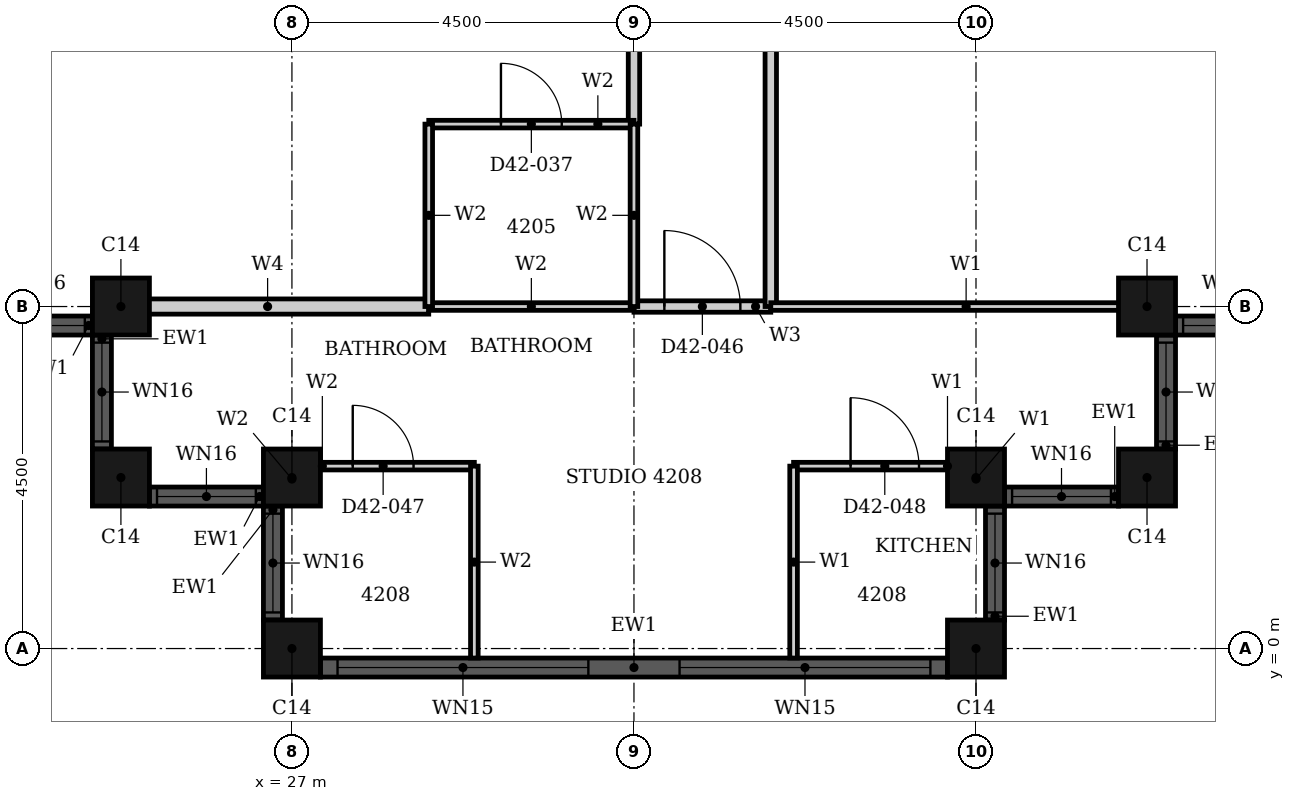
"""IFC4 building model, lengths in metres.
Left out: names, types, materials, properties, quantities, classifications, styles, units other than length and angle.
Written with IfcOpenShell. Run it as: python <this file> out.ifc"""

import sys

from ifc_helpers import new_model, si_unit, direction, frame, frame_2d, origin, origin_2d, place, context, subcontext, project, spatial, rectangle, hollow_rectangle, extrude, element, fill, save


model = new_model("IFC4")
c1 = context("Model", 3, precision=1e-05, world=origin(), true_north=direction((0.0, 1.0)))
c2 = subcontext(c1, "Body", "Model", "MODEL_VIEW")
j1 = project(units=[si_unit("LENGTHUNIT", "METRE"), si_unit("PLANEANGLEUNIT", "RADIAN")], contexts=[c1])
p1 = place(None, origin())
s1 = spatial("IfcSite", under=j1, at=p1, CompositionType="ELEMENT")
p2 = place(p1, origin())
s2 = spatial("IfcBuilding", under=s1, at=p2, CompositionType="ELEMENT")
p3 = place(p2, frame((0.0, 0.0, 169.1)))
s3 = spatial("IfcBuildingStorey", under=s2, at=p3, CompositionType="ELEMENT", Elevation=169.1)
for number, where, z_axis, x_axis in (
    (1, (24.75, 4.5, 0.0), (0.0, 0.0, 1.0), (1.0, 0.0, 0.0)),
    (2, (24.75, 2.25, 0.0), (0.0, 0.0, 1.0), (1.0, 0.0, 0.0)),
    (3, (27.0, 2.25, 0.0), (0.0, 0.0, 1.0), (1.0, 0.0, 0.0)),
    (4, (27.0, 0.0, 0.0), (0.0, 0.0, 1.0), (1.0, 0.0, 0.0)),
    (5, (36.0, 0.0, 0.0), (0.0, 0.0, 1.0), (1.0, 0.0, 0.0)),
    (6, (36.0, 2.25, 0.0), (0.0, 0.0, 1.0), (1.0, 0.0, 0.0)),
    (7, (38.25, 2.25, 0.0), (0.0, 0.0, 1.0), (1.0, 0.0, 0.0)),
    (8, (38.25, 4.5, 0.0), (0.0, 0.0, 1.0), (1.0, 0.0, 0.0)),
):
    element("IfcColumn", number, at=place(p3, frame(where, z_axis=z_axis, x_axis=x_axis)), inside=s3, PredefinedType="COLUMN", context=c2, shape_type="SweptSolid", body=[
        extrude(hollow_rectangle(XDim=0.75, YDim=0.75, WallThickness=0.024, at=origin_2d()), origin(), (0.0, 0.0, 1.0), 3.7),
    ])
p4 = place(p3, frame((22.875, 4.25, 0.0), z_axis=(0.0, 0.0, 1.0), x_axis=(1.0, 0.0, 0.0)))
e9 = element("IfcWall", 9, at=p4, inside=s3, PredefinedType="SOLIDWALL", context=c2, shape_type="SweptSolid", body=[
    extrude(rectangle(XDim=1.5, YDim=0.25, at=frame_2d((0.75, 0.0))), origin(), (0.0, 0.0, 1.0), 3.7),
])
p5 = place(p4, frame((0.1, 0.0, 0.9)))
e10 = element("IfcOpeningElement", 10, at=p5, cuts=e9, PredefinedType="OPENING", context=c2, shape_type="SweptSolid", body=[
    extrude(rectangle(XDim=1.3, YDim=1.85, at=frame_2d((0.65, 0.925))), frame((0.0, 0.135, 0.0), z_axis=(0.0, -1.0, 0.0), x_axis=(1.0, 0.0, 0.0)), (0.0, 0.0, 1.0), 0.27),
])
p6 = place(p3, frame((24.5, 4.125, 0.0), z_axis=(0.0, 0.0, 1.0), x_axis=(0.0, -1.0, 0.0)))
e11 = element("IfcWall", 11, at=p6, inside=s3, PredefinedType="SOLIDWALL", context=c2, shape_type="SweptSolid", body=[
    extrude(rectangle(XDim=1.5, YDim=0.25, at=frame_2d((0.75, 0.0))), origin(), (0.0, 0.0, 1.0), 3.7),
])
p7 = place(p6, frame((0.1, 0.0, 0.9)))
e12 = element("IfcOpeningElement", 12, at=p7, cuts=e11, PredefinedType="OPENING", context=c2, shape_type="SweptSolid", body=[
    extrude(rectangle(XDim=1.3, YDim=1.85, at=frame_2d((0.65, 0.925))), frame((0.0, 0.135, 0.0), z_axis=(0.0, -1.0, 0.0), x_axis=(1.0, 0.0, 0.0)), (0.0, 0.0, 1.0), 0.27),
])
p8 = place(p3, frame((25.125, 2.0, 0.0), z_axis=(0.0, 0.0, 1.0), x_axis=(1.0, 0.0, 0.0)))
e13 = element("IfcWall", 13, at=p8, inside=s3, PredefinedType="SOLIDWALL", context=c2, shape_type="SweptSolid", body=[
    extrude(rectangle(XDim=1.5, YDim=0.25, at=frame_2d((0.75, 0.0))), origin(), (0.0, 0.0, 1.0), 3.7),
])
p9 = place(p8, frame((0.1, 0.0, 0.9)))
e14 = element("IfcOpeningElement", 14, at=p9, cuts=e13, PredefinedType="OPENING", context=c2, shape_type="SweptSolid", body=[
    extrude(rectangle(XDim=1.3, YDim=1.85, at=frame_2d((0.65, 0.925))), frame((0.0, 0.135, 0.0), z_axis=(0.0, -1.0, 0.0), x_axis=(1.0, 0.0, 0.0)), (0.0, 0.0, 1.0), 0.27),
])
p10 = place(p3, frame((26.75, 1.875, 0.0), z_axis=(0.0, 0.0, 1.0), x_axis=(0.0, -1.0, 0.0)))
e15 = element("IfcWall", 15, at=p10, inside=s3, PredefinedType="SOLIDWALL", context=c2, shape_type="SweptSolid", body=[
    extrude(rectangle(XDim=1.5, YDim=0.25, at=frame_2d((0.75, 0.0))), origin(), (0.0, 0.0, 1.0), 3.7),
])
p11 = place(p10, frame((0.1, 0.0, 0.9)))
e16 = element("IfcOpeningElement", 16, at=p11, cuts=e15, PredefinedType="OPENING", context=c2, shape_type="SweptSolid", body=[
    extrude(rectangle(XDim=1.3, YDim=1.85, at=frame_2d((0.65, 0.925))), frame((0.0, 0.135, 0.0), z_axis=(0.0, -1.0, 0.0), x_axis=(1.0, 0.0, 0.0)), (0.0, 0.0, 1.0), 0.27),
])
p12 = place(p3, frame((27.375, -0.25, 0.0), z_axis=(0.0, 0.0, 1.0), x_axis=(1.0, 0.0, 0.0)))
e17 = element("IfcWall", 17, at=p12, inside=s3, PredefinedType="SOLIDWALL", context=c2, shape_type="SweptSolid", body=[
    extrude(rectangle(XDim=8.25, YDim=0.25, at=frame_2d((4.125, 0.0))), origin(), (0.0, 0.0, 1.0), 3.7),
])
p13 = place(p12, frame((0.225, 0.0, 0.45)))
e18 = element("IfcOpeningElement", 18, at=p13, cuts=e17, PredefinedType="OPENING", context=c2, shape_type="SweptSolid", body=[
    extrude(rectangle(XDim=3.3, YDim=2.3, at=frame_2d((1.65, 1.15))), frame((0.0, 0.135, 0.0), z_axis=(0.0, -1.0, 0.0), x_axis=(1.0, 0.0, 0.0)), (0.0, 0.0, 1.0), 0.27),
])
p14 = place(p12, frame((4.725, 0.0, 0.45)))
e19 = element("IfcOpeningElement", 19, at=p14, cuts=e17, PredefinedType="OPENING", context=c2, shape_type="SweptSolid", body=[
    extrude(rectangle(XDim=3.3, YDim=2.3, at=frame_2d((1.65, 1.15))), frame((0.0, 0.135, 0.0), z_axis=(0.0, -1.0, 0.0), x_axis=(1.0, 0.0, 0.0)), (0.0, 0.0, 1.0), 0.27),
])
p15 = place(p3, frame((36.25, 0.375, 0.0), z_axis=(0.0, 0.0, 1.0), x_axis=(0.0, 1.0, 0.0)))
e20 = element("IfcWall", 20, at=p15, inside=s3, PredefinedType="SOLIDWALL", context=c2, shape_type="SweptSolid", body=[
    extrude(rectangle(XDim=1.5, YDim=0.25, at=frame_2d((0.75, 0.0))), origin(), (0.0, 0.0, 1.0), 3.7),
])
p16 = place(p15, frame((0.1, 0.0, 0.9)))
e21 = element("IfcOpeningElement", 21, at=p16, cuts=e20, PredefinedType="OPENING", context=c2, shape_type="SweptSolid", body=[
    extrude(rectangle(XDim=1.3, YDim=1.85, at=frame_2d((0.65, 0.925))), frame((0.0, 0.135, 0.0), z_axis=(0.0, -1.0, 0.0), x_axis=(1.0, 0.0, 0.0)), (0.0, 0.0, 1.0), 0.27),
])
p17 = place(p3, frame((36.375, 2.0, 0.0), z_axis=(0.0, 0.0, 1.0), x_axis=(1.0, 0.0, 0.0)))
e22 = element("IfcWall", 22, at=p17, inside=s3, PredefinedType="SOLIDWALL", context=c2, shape_type="SweptSolid", body=[
    extrude(rectangle(XDim=1.5, YDim=0.25, at=frame_2d((0.75, 0.0))), origin(), (0.0, 0.0, 1.0), 3.7),
])
p18 = place(p17, frame((0.1, 0.0, 0.9)))
e23 = element("IfcOpeningElement", 23, at=p18, cuts=e22, PredefinedType="OPENING", context=c2, shape_type="SweptSolid", body=[
    extrude(rectangle(XDim=1.3, YDim=1.85, at=frame_2d((0.65, 0.925))), frame((0.0, 0.135, 0.0), z_axis=(0.0, -1.0, 0.0), x_axis=(1.0, 0.0, 0.0)), (0.0, 0.0, 1.0), 0.27),
])
p19 = place(p3, frame((38.5, 2.625, 0.0), z_axis=(0.0, 0.0, 1.0), x_axis=(0.0, 1.0, 0.0)))
e24 = element("IfcWall", 24, at=p19, inside=s3, PredefinedType="SOLIDWALL", context=c2, shape_type="SweptSolid", body=[
    extrude(rectangle(XDim=1.5, YDim=0.25, at=frame_2d((0.75, 0.0))), origin(), (0.0, 0.0, 1.0), 3.7),
])
p20 = place(p19, frame((0.1, 0.0, 0.9)))
e25 = element("IfcOpeningElement", 25, at=p20, cuts=e24, PredefinedType="OPENING", context=c2, shape_type="SweptSolid", body=[
    extrude(rectangle(XDim=1.3, YDim=1.85, at=frame_2d((0.65, 0.925))), frame((0.0, 0.135, 0.0), z_axis=(0.0, -1.0, 0.0), x_axis=(1.0, 0.0, 0.0)), (0.0, 0.0, 1.0), 0.27),
])
p21 = place(p3, frame((38.625, 4.25, 0.0), z_axis=(0.0, 0.0, 1.0), x_axis=(1.0, 0.0, 0.0)))
e26 = element("IfcWall", 26, at=p21, inside=s3, PredefinedType="SOLIDWALL", context=c2, shape_type="SweptSolid", body=[
    extrude(rectangle(XDim=1.5, YDim=0.25, at=frame_2d((0.75, 0.0))), origin(), (0.0, 0.0, 1.0), 3.7),
])
p22 = place(p21, frame((0.1, 0.0, 0.9)))
e27 = element("IfcOpeningElement", 27, at=p22, cuts=e26, PredefinedType="OPENING", context=c2, shape_type="SweptSolid", body=[
    extrude(rectangle(XDim=1.3, YDim=1.85, at=frame_2d((0.65, 0.925))), frame((0.0, 0.135, 0.0), z_axis=(0.0, -1.0, 0.0), x_axis=(1.0, 0.0, 0.0)), (0.0, 0.0, 1.0), 0.27),
])
p23 = place(p3, frame((31.5, 4.5, 0.0), z_axis=(0.0, 0.0, 1.0), x_axis=(1.0, 0.0, 0.0)))
e28 = element("IfcWall", 28, at=p23, inside=s3, PredefinedType="PARTITIONING", context=c2, shape_type="SweptSolid", body=[
    extrude(rectangle(XDim=1.8, YDim=0.15, at=frame_2d((0.9, 0.0))), origin(), (0.0, 0.0, 1.0), 3.4),
])
p24 = place(p23, frame((0.4, 0.0, 0.0)))
e29 = element("IfcOpeningElement", 29, at=p24, cuts=e28, PredefinedType="OPENING", context=c2, shape_type="SweptSolid", body=[
    extrude(rectangle(XDim=1.0, YDim=2.2, at=frame_2d((0.5, 1.1))), frame((0.0, 0.085, 0.0), z_axis=(0.0, -1.0, 0.0), x_axis=(1.0, 0.0, 0.0)), (0.0, 0.0, 1.0), 0.17),
])
p25 = place(p3, frame((31.5, 6.9, 0.0), z_axis=(0.0, 0.0, 1.0), x_axis=(0.0, 1.0, 0.0)))
e30 = element("IfcWall", 30, at=p25, inside=s3, PredefinedType="PARTITIONING", context=c2, shape_type="SweptSolid", body=[
    extrude(rectangle(XDim=13.8, YDim=0.15, at=frame_2d((6.9, 0.0))), origin(), (0.0, 0.0, 1.0), 2.68),
])
p26 = place(p25, frame((1.3, 0.0, 0.0)))
e31 = element("IfcOpeningElement", 31, at=p26, cuts=e30, PredefinedType="OPENING", context=c2, shape_type="SweptSolid", body=[
    extrude(rectangle(XDim=1.0, YDim=2.2, at=frame_2d((0.5, 1.1))), frame((0.0, 0.085, 0.0), z_axis=(0.0, -1.0, 0.0), x_axis=(1.0, 0.0, 0.0)), (0.0, 0.0, 1.0), 0.17),
])
p27 = place(p3, frame((33.3, 4.5, 0.0), z_axis=(0.0, 0.0, 1.0), x_axis=(0.0, 1.0, 0.0)))
e32 = element("IfcWall", 32, at=p27, inside=s3, PredefinedType="PARTITIONING", context=c2, shape_type="SweptSolid", body=[
    extrude(rectangle(XDim=16.199, YDim=0.15, at=frame_2d((8.1, 0.0))), origin(), (0.0, 0.0, 1.0), 3.4),
])
p28 = place(p27, frame((12.099, 0.0, 0.0)))
e33 = element("IfcOpeningElement", 33, at=p28, cuts=e32, PredefinedType="OPENING", context=c2, shape_type="SweptSolid", body=[
    extrude(rectangle(XDim=1.0, YDim=2.2, at=frame_2d((0.5, 1.1))), frame((0.0, 0.085, 0.0), z_axis=(0.0, -1.0, 0.0), x_axis=(1.0, 0.0, 0.0)), (0.0, 0.0, 1.0), 0.17),
])
p29 = place(p27, frame((4.0, 0.0, 0.0)))
e34 = element("IfcOpeningElement", 34, at=p29, cuts=e32, PredefinedType="OPENING", context=c2, shape_type="SweptSolid", body=[
    extrude(rectangle(XDim=1.0, YDim=2.1, at=frame_2d((0.5, 1.05))), frame((0.0, 0.085, 0.0), z_axis=(0.0, -1.0, 0.0), x_axis=(1.0, 0.0, 0.0)), (0.0, 0.0, 1.0), 0.17),
])
p30 = place(p3, frame((33.6, 2.4, 0.0), z_axis=(0.0, 0.0, 1.0), x_axis=(1.0, 0.0, 0.0)))
e35 = element("IfcWall", 35, at=p30, inside=s3, PredefinedType="PARTITIONING", context=c2, shape_type="SweptSolid", body=[
    extrude(rectangle(XDim=2.4, YDim=0.1, at=frame_2d((1.2, 0.0))), origin(), (0.0, 0.0, 1.0), 3.4),
])
p31 = place(p30, frame((0.75, 0.0, 0.0)))
e36 = element("IfcOpeningElement", 36, at=p31, cuts=e35, PredefinedType="OPENING", context=c2, shape_type="SweptSolid", body=[
    extrude(rectangle(XDim=0.9, YDim=2.1, at=frame_2d((0.45, 1.05))), frame((0.0, 0.06, 0.0), z_axis=(0.0, -1.0, 0.0), x_axis=(1.0, 0.0, 0.0)), (0.0, 0.0, 1.0), 0.12),
])
p32 = place(p3, frame((33.3, 4.5, 0.0), z_axis=(0.0, 0.0, 1.0), x_axis=(1.0, 0.0, 0.0)))
e37 = element("IfcWall", 37, at=p32, inside=s3, PredefinedType="PARTITIONING", context=c2, shape_type="SweptSolid", body=[
    extrude(rectangle(XDim=5.14, YDim=0.1, at=frame_2d((2.57, 0.0))), origin(), (0.0, 0.0, 1.0), 3.4),
])
p33 = place(p3, frame((33.6, -0.125, 0.0), z_axis=(0.0, 0.0, 1.0), x_axis=(0.0, 1.0, 0.0)))
e38 = element("IfcWall", 38, at=p33, inside=s3, PredefinedType="PARTITIONING", context=c2, shape_type="SweptSolid", body=[
    extrude(rectangle(XDim=2.525, YDim=0.1, at=frame_2d((1.262, 0.0))), origin(), (0.0, 0.0, 1.0), 3.4),
])
p34 = place(p3, frame((36.0, 2.06, 0.0), z_axis=(0.0, 0.0, 1.0), x_axis=(0.0, 1.0, 0.0)))
e39 = element("IfcWall", 39, at=p34, inside=s3, PredefinedType="PARTITIONING", context=c2, shape_type="SweptSolid", body=[
    extrude(rectangle(XDim=0.34, YDim=0.1, at=frame_2d((0.17, 0.0))), origin(), (0.0, 0.0, 1.0), 3.4),
])
p35 = place(p3, frame((24.56, 4.5, 0.0), z_axis=(0.0, 0.0, 1.0), x_axis=(1.0, 0.0, 0.0)))
e40 = element("IfcWall", 40, at=p35, inside=s3, PredefinedType="PARTITIONING", context=c2, shape_type="SweptSolid", body=[
    extrude(rectangle(XDim=4.24, YDim=0.2, at=frame_2d((2.12, 0.0))), origin(), (0.0, 0.0, 1.0), 3.4),
])
p36 = place(p3, frame((27.0, 2.4, 0.0), z_axis=(0.0, 0.0, 1.0), x_axis=(1.0, 0.0, 0.0)))
e41 = element("IfcWall", 41, at=p36, inside=s3, PredefinedType="PARTITIONING", context=c2, shape_type="SweptSolid", body=[
    extrude(rectangle(XDim=2.4, YDim=0.1, at=frame_2d((1.2, 0.0))), origin(), (0.0, 0.0, 1.0), 3.4),
])
p37 = place(p36, frame((0.8, 0.0, 0.0)))
e42 = element("IfcOpeningElement", 42, at=p37, cuts=e41, PredefinedType="OPENING", context=c2, shape_type="SweptSolid", body=[
    extrude(rectangle(XDim=0.8, YDim=2.1, at=frame_2d((0.4, 1.05))), frame((0.0, 0.06, 0.0), z_axis=(0.0, -1.0, 0.0), x_axis=(1.0, 0.0, 0.0)), (0.0, 0.0, 1.0), 0.12),
])
p38 = place(p3, frame((28.8, 4.5, 0.0), z_axis=(0.0, 0.0, 1.0), x_axis=(1.0, 0.0, 0.0)))
e43 = element("IfcWall", 43, at=p38, inside=s3, PredefinedType="PARTITIONING", context=c2, shape_type="SweptSolid", body=[
    extrude(rectangle(XDim=2.7, YDim=0.1, at=frame_2d((1.35, 0.0))), origin(), (0.0, 0.0, 1.0), 3.4),
])
p39 = place(p3, frame((28.8, 6.9, 0.0), z_axis=(0.0, 0.0, 1.0), x_axis=(1.0, 0.0, 0.0)))
e44 = element("IfcWall", 44, at=p39, inside=s3, PredefinedType="PARTITIONING", context=c2, shape_type="SweptSolid", body=[
    extrude(rectangle(XDim=2.7, YDim=0.1, at=frame_2d((1.35, 0.0))), origin(), (0.0, 0.0, 1.0), 3.4),
])
p40 = place(p39, frame((0.95, 0.0, 0.0)))
e45 = element("IfcOpeningElement", 45, at=p40, cuts=e44, PredefinedType="OPENING", context=c2, shape_type="SweptSolid", body=[
    extrude(rectangle(XDim=0.8, YDim=2.1, at=frame_2d((0.4, 1.05))), frame((0.0, 0.06, 0.0), z_axis=(0.0, -1.0, 0.0), x_axis=(1.0, 0.0, 0.0)), (0.0, 0.0, 1.0), 0.12),
])
p41 = place(p3, frame((27.0, 2.06, 0.0), z_axis=(0.0, 0.0, 1.0), x_axis=(0.0, 1.0, 0.0)))
e46 = element("IfcWall", 46, at=p41, inside=s3, PredefinedType="PARTITIONING", context=c2, shape_type="SweptSolid", body=[
    extrude(rectangle(XDim=0.34, YDim=0.1, at=frame_2d((0.17, 0.0))), origin(), (0.0, 0.0, 1.0), 3.4),
])
p42 = place(p3, frame((28.8, 4.5, 0.0), z_axis=(0.0, 0.0, 1.0), x_axis=(0.0, 1.0, 0.0)))
e47 = element("IfcWall", 47, at=p42, inside=s3, PredefinedType="PARTITIONING", context=c2, shape_type="SweptSolid", body=[
    extrude(rectangle(XDim=2.4, YDim=0.1, at=frame_2d((1.2, 0.0))), origin(), (0.0, 0.0, 1.0), 3.4),
])
p43 = place(p3, frame((29.4, -0.125, 0.0), z_axis=(0.0, 0.0, 1.0), x_axis=(0.0, 1.0, 0.0)))
e48 = element("IfcWall", 48, at=p43, inside=s3, PredefinedType="PARTITIONING", context=c2, shape_type="SweptSolid", body=[
    extrude(rectangle(XDim=2.525, YDim=0.1, at=frame_2d((1.262, 0.0))), origin(), (0.0, 0.0, 1.0), 3.4),
])
p44 = place(p3, frame((31.5, 4.5, 0.0), z_axis=(0.0, 0.0, 1.0), x_axis=(0.0, 1.0, 0.0)))
e49 = element("IfcWall", 49, at=p44, inside=s3, PredefinedType="PARTITIONING", context=c2, shape_type="SweptSolid", body=[
    extrude(rectangle(XDim=2.4, YDim=0.1, at=frame_2d((1.2, 0.0))), origin(), (0.0, 0.0, 1.0), 2.68),
])
p45 = place(p5, origin())
e50 = element("IfcWindow", 50, at=p45, inside=s3, PartitioningType="SINGLE_PANEL", PredefinedType="WINDOW", context=c2, shape_type="SweptSolid", body=[
    extrude(rectangle(XDim=1.3, YDim=1.85, at=frame_2d((0.65, 0.925))), frame((0.0, 0.03, 0.0), z_axis=(0.0, -1.0, 0.0), x_axis=(1.0, 0.0, 0.0)), (0.0, 0.0, 1.0), 0.06),
])
fill(e10, e50)
p46 = place(p7, origin())
e51 = element("IfcWindow", 51, at=p46, inside=s3, PartitioningType="SINGLE_PANEL", PredefinedType="WINDOW", context=c2, shape_type="SweptSolid", body=[
    extrude(rectangle(XDim=1.3, YDim=1.85, at=frame_2d((0.65, 0.925))), frame((0.0, 0.03, 0.0), z_axis=(0.0, -1.0, 0.0), x_axis=(1.0, 0.0, 0.0)), (0.0, 0.0, 1.0), 0.06),
])
fill(e12, e51)
p47 = place(p9, origin())
e52 = element("IfcWindow", 52, at=p47, inside=s3, PartitioningType="SINGLE_PANEL", PredefinedType="WINDOW", context=c2, shape_type="SweptSolid", body=[
    extrude(rectangle(XDim=1.3, YDim=1.85, at=frame_2d((0.65, 0.925))), frame((0.0, 0.03, 0.0), z_axis=(0.0, -1.0, 0.0), x_axis=(1.0, 0.0, 0.0)), (0.0, 0.0, 1.0), 0.06),
])
fill(e14, e52)
p48 = place(p11, origin())
e53 = element("IfcWindow", 53, at=p48, inside=s3, PartitioningType="SINGLE_PANEL", PredefinedType="WINDOW", context=c2, shape_type="SweptSolid", body=[
    extrude(rectangle(XDim=1.3, YDim=1.85, at=frame_2d((0.65, 0.925))), frame((0.0, 0.03, 0.0), z_axis=(0.0, -1.0, 0.0), x_axis=(1.0, 0.0, 0.0)), (0.0, 0.0, 1.0), 0.06),
])
fill(e16, e53)
p49 = place(p13, origin())
e54 = element("IfcWindow", 54, at=p49, inside=s3, PartitioningType="SINGLE_PANEL", PredefinedType="WINDOW", context=c2, shape_type="SweptSolid", body=[
    extrude(rectangle(XDim=3.3, YDim=2.3, at=frame_2d((1.65, 1.15))), frame((0.0, 0.03, 0.0), z_axis=(0.0, -1.0, 0.0), x_axis=(1.0, 0.0, 0.0)), (0.0, 0.0, 1.0), 0.06),
])
fill(e18, e54)
p50 = place(p14, origin())
e55 = element("IfcWindow", 55, at=p50, inside=s3, PartitioningType="SINGLE_PANEL", PredefinedType="WINDOW", context=c2, shape_type="SweptSolid", body=[
    extrude(rectangle(XDim=3.3, YDim=2.3, at=frame_2d((1.65, 1.15))), frame((0.0, 0.03, 0.0), z_axis=(0.0, -1.0, 0.0), x_axis=(1.0, 0.0, 0.0)), (0.0, 0.0, 1.0), 0.06),
])
fill(e19, e55)
p51 = place(p16, origin())
e56 = element("IfcWindow", 56, at=p51, inside=s3, PartitioningType="SINGLE_PANEL", PredefinedType="WINDOW", context=c2, shape_type="SweptSolid", body=[
    extrude(rectangle(XDim=1.3, YDim=1.85, at=frame_2d((0.65, 0.925))), frame((0.0, 0.03, 0.0), z_axis=(0.0, -1.0, 0.0), x_axis=(1.0, 0.0, 0.0)), (0.0, 0.0, 1.0), 0.06),
])
fill(e21, e56)
p52 = place(p18, origin())
e57 = element("IfcWindow", 57, at=p52, inside=s3, PartitioningType="SINGLE_PANEL", PredefinedType="WINDOW", context=c2, shape_type="SweptSolid", body=[
    extrude(rectangle(XDim=1.3, YDim=1.85, at=frame_2d((0.65, 0.925))), frame((0.0, 0.03, 0.0), z_axis=(0.0, -1.0, 0.0), x_axis=(1.0, 0.0, 0.0)), (0.0, 0.0, 1.0), 0.06),
])
fill(e23, e57)
p53 = place(p20, origin())
e58 = element("IfcWindow", 58, at=p53, inside=s3, PartitioningType="SINGLE_PANEL", PredefinedType="WINDOW", context=c2, shape_type="SweptSolid", body=[
    extrude(rectangle(XDim=1.3, YDim=1.85, at=frame_2d((0.65, 0.925))), frame((0.0, 0.03, 0.0), z_axis=(0.0, -1.0, 0.0), x_axis=(1.0, 0.0, 0.0)), (0.0, 0.0, 1.0), 0.06),
])
fill(e25, e58)
p54 = place(p22, origin())
e59 = element("IfcWindow", 59, at=p54, inside=s3, PartitioningType="SINGLE_PANEL", PredefinedType="WINDOW", context=c2, shape_type="SweptSolid", body=[
    extrude(rectangle(XDim=1.3, YDim=1.85, at=frame_2d((0.65, 0.925))), frame((0.0, 0.03, 0.0), z_axis=(0.0, -1.0, 0.0), x_axis=(1.0, 0.0, 0.0)), (0.0, 0.0, 1.0), 0.06),
])
fill(e27, e59)
p55 = place(p40, origin())
e60 = element("IfcDoor", 60, at=p55, inside=s3, OperationType="SINGLE_SWING_LEFT", PredefinedType="DOOR", context=c2, shape_type="SweptSolid", body=[
    extrude(rectangle(XDim=0.8, YDim=2.1, at=frame_2d((0.4, 1.05))), frame((0.0, 0.025, 0.0), z_axis=(0.0, -1.0, 0.0), x_axis=(1.0, 0.0, 0.0)), (0.0, 0.0, 1.0), 0.05),
])
fill(e45, e60)
p56 = place(p24, origin())
e61 = element("IfcDoor", 61, at=p56, inside=s3, OperationType="SINGLE_SWING_RIGHT", PredefinedType="DOOR", context=c2, shape_type="SweptSolid", body=[
    extrude(rectangle(XDim=1.0, YDim=2.2, at=frame_2d((0.5, 1.1))), frame((0.0, 0.025, 0.0), z_axis=(0.0, -1.0, 0.0), x_axis=(1.0, 0.0, 0.0)), (0.0, 0.0, 1.0), 0.05),
])
fill(e29, e61)
p57 = place(p37, origin())
e62 = element("IfcDoor", 62, at=p57, inside=s3, OperationType="SINGLE_SWING_LEFT", PredefinedType="DOOR", context=c2, shape_type="SweptSolid", body=[
    extrude(rectangle(XDim=0.8, YDim=2.1, at=frame_2d((0.4, 1.05))), frame((0.0, 0.025, 0.0), z_axis=(0.0, -1.0, 0.0), x_axis=(1.0, 0.0, 0.0)), (0.0, 0.0, 1.0), 0.05),
])
fill(e42, e62)
p58 = place(p31, origin())
e63 = element("IfcDoor", 63, at=p58, inside=s3, OperationType="SINGLE_SWING_RIGHT", PredefinedType="DOOR", context=c2, shape_type="SweptSolid", body=[
    extrude(rectangle(XDim=0.9, YDim=2.1, at=frame_2d((0.45, 1.05))), frame((0.0, 0.025, 0.0), z_axis=(0.0, -1.0, 0.0), x_axis=(1.0, 0.0, 0.0)), (0.0, 0.0, 1.0), 0.05),
])
fill(e36, e63)
save(model, sys.argv[1])
